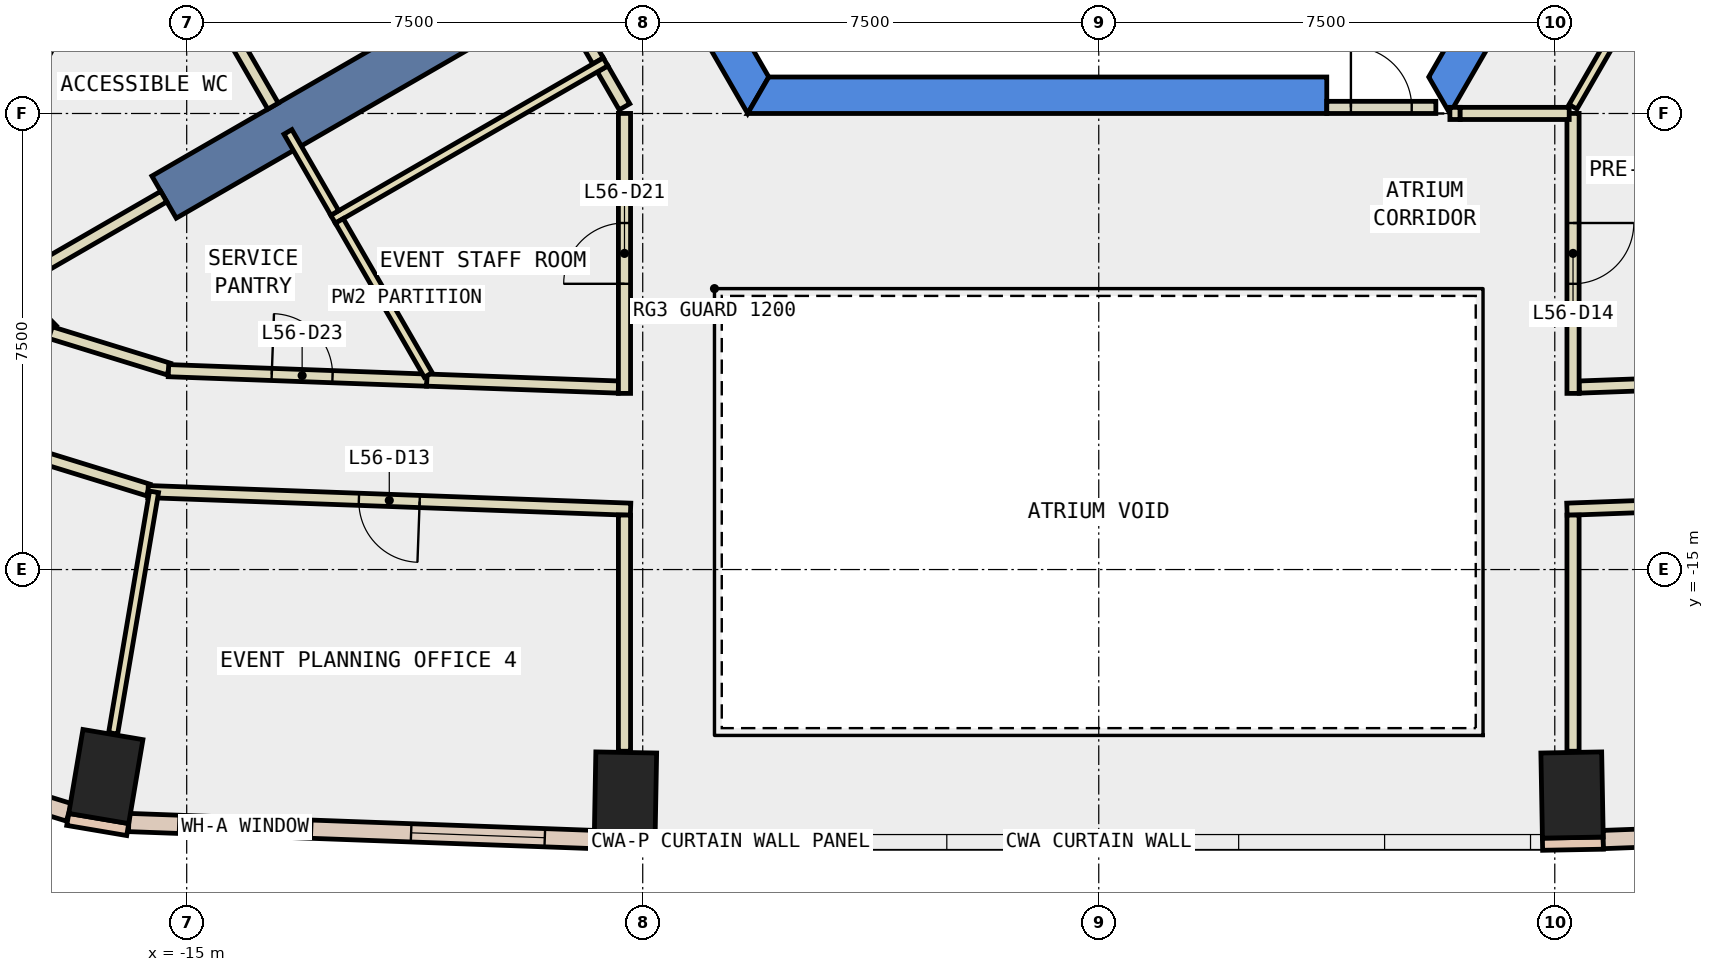
"""IFC4 building model, lengths in metres.
Left out: names, types, materials, properties, quantities, classifications, styles, units other than length and angle.
Written with IfcOpenShell. Run it as: python <this file> out.ifc"""

import sys

from ifc_helpers import new_model, si_unit, direction, frame, frame_2d, origin, origin_2d, place, context, subcontext, project, spatial, polyline, rectangle, outline, extrude, element, fill, save


model = new_model("IFC4")
c1 = context("Model", 3, precision=1e-05, world=origin(), true_north=direction((0.0, 1.0)))
c2 = subcontext(c1, "Body", "Model", "MODEL_VIEW")
j1 = project(units=[si_unit("LENGTHUNIT", "METRE"), si_unit("PLANEANGLEUNIT", "RADIAN")], contexts=[c1])
p1 = place(None, origin())
s1 = spatial("IfcSite", under=j1, at=p1, CompositionType="ELEMENT")
p2 = place(p1, origin())
s2 = spatial("IfcBuilding", under=s1, at=p2, CompositionType="ELEMENT")
p3 = place(p2, frame((0.0, 0.0, 248.6)))
s3 = spatial("IfcBuildingStorey", under=s2, at=p3, CompositionType="ELEMENT", Elevation=248.6)
for number, where, z_axis, x_axis in (
    (1, (-16.33, -18.404, -0.34), (0.0, 0.0, 1.0), (-0.986, 0.167, 0.0)),
    (2, (-7.784, -18.708, -0.34), (0.0, 0.0, 1.0), (-1.0, 0.018, 0.0)),
    (3, (7.784, -18.708, -0.34), (0.0, 0.0, 1.0), (1.0, 0.018, 0.0)),
):
    element("IfcColumn", number, at=place(p3, frame(where, z_axis=z_axis, x_axis=x_axis)), inside=s3, PredefinedType="COLUMN", context=c2, shape_type="SweptSolid", body=[
        extrude(rectangle(XDim=1.0, YDim=1.4, at=origin_2d()), origin(), (0.0, 0.0, 1.0), 3.6),
    ])
p4 = place(p3, frame((0.0, 0.0, -0.34)))
e4 = element("IfcWall", 4, at=p4, inside=s3, PredefinedType="SHEAR", context=c2, shape_type="SweptSolid", body=[
    extrude(outline(polyline([(-11.547, 2.5), (-5.774, -7.5), (-5.427, -6.9), (-10.854, 2.5), (-11.547, 2.5)])), origin(), (0.0, 0.0, 1.0), 3.6),
])
p5 = place(p3, frame((0.0, 0.0, -0.34)))
e5 = element("IfcWall", 5, at=p5, inside=s3, PredefinedType="SHEAR", context=c2, shape_type="SweptSolid", body=[
    extrude(outline(polyline([(3.75, -7.5), (3.75, -6.9), (-5.427, -6.9), (-5.774, -7.5), (3.75, -7.5)])), origin(), (0.0, 0.0, 1.0), 3.6),
])
p6 = place(p3, frame((0.0, 0.0, -0.34)))
e6 = element("IfcWall", 6, at=p6, inside=s3, PredefinedType="SHEAR", context=c2, shape_type="SweptSolid", body=[
    extrude(outline(polyline([(5.774, -7.5), (11.547, 2.5), (10.854, 2.5), (5.427, -6.9), (5.774, -7.5)])), origin(), (0.0, 0.0, 1.0), 3.6),
])
for number, where, z_axis, x_axis in (
    (7, (7.578, -4.375, -0.34), (0.0, 0.0, 1.0), (0.866, -0.5, 0.0)),
    (8, (-7.578, -4.375, -0.34), (0.0, 0.0, 1.0), (-0.866, -0.5, 0.0)),
):
    element("IfcWall", number, at=place(p3, frame(where, z_axis=z_axis, x_axis=x_axis)), inside=s3, PredefinedType="SHEAR", context=c2, shape_type="SweptSolid", body=[
        extrude(rectangle(XDim=9.0, YDim=0.8, at=frame_2d((4.5, 0.0))), origin(), (0.0, 0.0, 1.0), 3.6),
    ])
for number, where, z_axis, x_axis in (
    (9, (-16.956, -19.109, 0.0), (0.0, 0.0, 1.0), (0.986, -0.167, 0.0)),
    (10, (-8.298, -19.499, 0.0), (0.0, 0.0, 1.0), (1.0, -0.018, 0.0)),
    (11, (7.298, -19.517, 0.0), (0.0, 0.0, 1.0), (1.0, 0.018, 0.0)),
):
    element("IfcWall", number, at=place(p3, frame(where, z_axis=z_axis, x_axis=x_axis)), inside=s3, PredefinedType="STANDARD", context=c2, shape_type="SweptSolid", body=[
        extrude(rectangle(XDim=1.0, YDim=0.2, at=frame_2d((0.5, 0.0))), origin(), (0.0, 0.0, 1.0), 3.26),
    ])
p7 = place(p3, frame((-15.952, -19.16, 0.0), z_axis=(0.0, 0.0, 1.0), x_axis=(0.999331753125, -0.036551979363, 0.0)))
e12 = element("IfcWall", 12, at=p7, inside=s3, PredefinedType="STANDARD", context=c2, shape_type="SweptSolid", body=[
    extrude(rectangle(XDim=7.661, YDim=0.3, at=frame_2d((3.831, 0.0))), origin(), (0.0, 0.0, 1.0), 3.26),
])
p8 = place(p7, frame((0.815, 0.0, 0.9)))
e13 = element("IfcOpeningElement", 13, at=p8, cuts=e12, PredefinedType="OPENING", context=c2, shape_type="SweptSolid", body=[
    extrude(rectangle(XDim=2.2, YDim=2.0, at=frame_2d((1.1, 1.0))), frame((0.0, 0.16, 0.0), z_axis=(0.0, -1.0, 0.0), x_axis=(1.0, 0.0, 0.0)), (0.0, 0.0, 1.0), 0.32),
])
p9 = place(p7, frame((4.646, 0.0, 0.9)))
e14 = element("IfcOpeningElement", 14, at=p9, cuts=e12, PredefinedType="OPENING", context=c2, shape_type="SweptSolid", body=[
    extrude(rectangle(XDim=2.2, YDim=2.0, at=frame_2d((1.1, 1.0))), frame((0.0, 0.16, 0.0), z_axis=(0.0, -1.0, 0.0), x_axis=(1.0, 0.0, 0.0)), (0.0, 0.0, 1.0), 0.32),
])
p10 = place(p3, frame((8.296, -19.44, 0.0), z_axis=(0.0, 0.0, 1.0), x_axis=(0.999331753125, 0.036551979363, 0.0)))
e15 = element("IfcWall", 15, at=p10, inside=s3, PredefinedType="STANDARD", context=c2, shape_type="SweptSolid", body=[
    extrude(rectangle(XDim=7.661, YDim=0.3, at=frame_2d((3.831, 0.0))), origin(), (0.0, 0.0, 1.0), 3.26),
])
p11 = place(p10, frame((0.815, 0.0, 0.9)))
e16 = element("IfcOpeningElement", 16, at=p11, cuts=e15, PredefinedType="OPENING", context=c2, shape_type="SweptSolid", body=[
    extrude(rectangle(XDim=2.2, YDim=2.0, at=frame_2d((1.1, 1.0))), frame((0.0, 0.16, 0.0), z_axis=(0.0, -1.0, 0.0), x_axis=(1.0, 0.0, 0.0)), (0.0, 0.0, 1.0), 0.32),
])
p12 = place(p10, frame((4.646, 0.0, 0.9)))
e17 = element("IfcOpeningElement", 17, at=p12, cuts=e15, PredefinedType="OPENING", context=c2, shape_type="SweptSolid", body=[
    extrude(rectangle(XDim=2.2, YDim=2.0, at=frame_2d((1.1, 1.0))), frame((0.0, 0.16, 0.0), z_axis=(0.0, -1.0, 0.0), x_axis=(1.0, 0.0, 0.0)), (0.0, 0.0, 1.0), 0.32),
])
p13 = place(p3, frame((-20.661, -17.845, 0.0), z_axis=(0.0, 0.0, 1.0), x_axis=(0.955646189569, -0.2945171648, 0.0)))
e18 = element("IfcWall", 18, at=p13, inside=s3, PredefinedType="STANDARD", context=c2, shape_type="SweptSolid", body=[
    extrude(rectangle(XDim=3.898, YDim=0.3, at=frame_2d((1.949, 0.0))), origin(), (0.0, 0.0, 1.0), 3.26),
])
p14 = place(p13, frame((1.249, 0.0, 0.9)))
e19 = element("IfcOpeningElement", 19, at=p14, cuts=e18, PredefinedType="OPENING", context=c2, shape_type="SweptSolid", body=[
    extrude(rectangle(XDim=1.4, YDim=2.0, at=frame_2d((0.7, 1.0))), frame((0.0, 0.16, 0.0), z_axis=(0.0, -1.0, 0.0), x_axis=(1.0, 0.0, 0.0)), (0.0, 0.0, 1.0), 0.32),
])
p15 = place(p3, frame((7.9, -11.999, 0.0), z_axis=(0.0, 0.0, 1.0), x_axis=(0.999343711998, 0.036223546064, 0.0)))
e20 = element("IfcWall", 20, at=p15, inside=s3, PredefinedType="PARTITIONING", context=c2, shape_type="SweptSolid", body=[
    extrude(rectangle(XDim=2.979, YDim=0.2, at=frame_2d((1.49, 0.0))), origin(), (0.0, 0.0, 1.0), 3.26),
])
p16 = place(p3, frame((-8.235, -6.636, 0.0), z_axis=(0.0, 0.0, 1.0), x_axis=(-0.500089055364, 0.86597398154, 0.0)))
e21 = element("IfcWall", 21, at=p16, inside=s3, PredefinedType="PARTITIONING", context=c2, shape_type="SweptSolid", body=[
    extrude(rectangle(XDim=1.23, YDim=0.2, at=frame_2d((0.615, 0.0))), origin(), (0.0, 0.0, 1.0), 3.26),
])
p17 = place(p3, frame((-7.8, -7.39, 0.0), z_axis=(0.0, 0.0, 1.0), x_axis=(-0.499712670472, 0.866191230024, 0.0)))
e22 = element("IfcWall", 22, at=p17, inside=s3, PredefinedType="PARTITIONING", context=c2, shape_type="SweptSolid", body=[
    extrude(rectangle(XDim=0.72, YDim=0.2, at=frame_2d((0.36, 0.0))), origin(), (0.0, 0.0, 1.0), 3.26),
])
p18 = place(p3, frame((-11.052, -11.884, 0.0), z_axis=(0.0, 0.0, 1.0), x_axis=(0.999335249241, -0.036456270033, 0.0)))
e23 = element("IfcWall", 23, at=p18, inside=s3, PredefinedType="PARTITIONING", context=c2, shape_type="SweptSolid", body=[
    extrude(rectangle(XDim=3.154, YDim=0.2, at=frame_2d((1.577, 0.0))), origin(), (0.0, 0.0, 1.0), 3.26),
])
p19 = place(p3, frame((-15.746, -3.458, 0.0), z_axis=(0.0, 0.0, 1.0), x_axis=(-0.465179971699, -0.885216128372, 0.0)))
e24 = element("IfcWall", 24, at=p19, inside=s3, PredefinedType="PARTITIONING", context=c2, shape_type="SweptSolid", body=[
    extrude(rectangle(XDim=4.424, YDim=0.2, at=frame_2d((2.212, 0.0))), origin(), (0.0, 0.0, 1.0), 3.26),
])
p20 = place(p19, frame((1.712, 0.0, 0.0)))
e25 = element("IfcOpeningElement", 25, at=p20, cuts=e24, PredefinedType="OPENING", context=c2, shape_type="SweptSolid", body=[
    extrude(rectangle(XDim=1.0, YDim=2.1, at=frame_2d((0.5, 1.05))), frame((0.0, 0.11, 0.0), z_axis=(0.0, -1.0, 0.0), x_axis=(1.0, 0.0, 0.0)), (0.0, 0.0, 1.0), 0.22),
])
p21 = place(p3, frame((-17.915, -10.344, 0.0), z_axis=(0.0, 0.0, 1.0), x_axis=(0.698527813511, -0.715582904877, 0.0)))
e26 = element("IfcWall", 26, at=p21, inside=s3, PredefinedType="PARTITIONING", context=c2, shape_type="SweptSolid", body=[
    extrude(rectangle(XDim=1.002, YDim=0.2, at=frame_2d((0.501, 0.0))), origin(), (0.0, 0.0, 1.0), 3.26),
])
p22 = place(p3, frame((-17.241, -11.103, 0.0), z_axis=(0.0, 0.0, 1.0), x_axis=(0.95563113363, -0.294566013716, 0.0)))
e27 = element("IfcWall", 27, at=p22, inside=s3, PredefinedType="PARTITIONING", context=c2, shape_type="SweptSolid", body=[
    extrude(rectangle(XDim=2.036, YDim=0.2, at=frame_2d((1.018, 0.0))), origin(), (0.0, 0.0, 1.0), 3.26),
])
p23 = place(p3, frame((-15.3, -11.729, 0.0), z_axis=(0.0, 0.0, 1.0), x_axis=(0.999326350165, -0.036699398722, 0.0)))
e28 = element("IfcWall", 28, at=p23, inside=s3, PredefinedType="PARTITIONING", context=c2, shape_type="SweptSolid", body=[
    extrude(rectangle(XDim=4.251, YDim=0.2, at=frame_2d((2.125, 0.0))), origin(), (0.0, 0.0, 1.0), 3.26),
])
p24 = place(p23, frame((1.7, 0.0, 0.0)))
e29 = element("IfcOpeningElement", 29, at=p24, cuts=e28, PredefinedType="OPENING", context=c2, shape_type="SweptSolid", body=[
    extrude(rectangle(XDim=1.0, YDim=2.1, at=frame_2d((0.5, 1.05))), frame((0.0, 0.11, 0.0), z_axis=(0.0, -1.0, 0.0), x_axis=(1.0, 0.0, 0.0)), (0.0, 0.0, 1.0), 0.22),
])
p25 = place(p3, frame((15.636, -13.718, 0.0), z_axis=(0.0, 0.0, 1.0), x_axis=(-0.99933282306, -0.036522715615, 0.0)))
e30 = element("IfcWall", 30, at=p25, inside=s3, PredefinedType="PARTITIONING", context=c2, shape_type="SweptSolid", body=[
    extrude(rectangle(XDim=7.941, YDim=0.2, at=frame_2d((3.971, 0.0))), origin(), (0.0, 0.0, 1.0), 3.26),
])
p26 = place(p25, frame((3.471, 0.0, 0.0)))
e31 = element("IfcOpeningElement", 31, at=p26, cuts=e30, PredefinedType="OPENING", context=c2, shape_type="SweptSolid", body=[
    extrude(rectangle(XDim=1.0, YDim=2.1, at=frame_2d((0.5, 1.05))), frame((0.0, 0.11, 0.0), z_axis=(0.0, -1.0, 0.0), x_axis=(1.0, 0.0, 0.0)), (0.0, 0.0, 1.0), 0.22),
])
p27 = place(p3, frame((-19.696, -6.675, 0.0), z_axis=(0.0, 0.0, 1.0), x_axis=(0.465165163774, 0.88522390976, 0.0)))
e32 = element("IfcWall", 32, at=p27, inside=s3, PredefinedType="PARTITIONING", context=c2, shape_type="SweptSolid", body=[
    extrude(rectangle(XDim=5.835, YDim=0.2, at=frame_2d((2.917, 0.0))), origin(), (0.0, 0.0, 1.0), 3.26),
])
p28 = place(p27, frame((2.492, 0.0, 0.0)))
e33 = element("IfcOpeningElement", 33, at=p28, cuts=e32, PredefinedType="OPENING", context=c2, shape_type="SweptSolid", body=[
    extrude(rectangle(XDim=1.0, YDim=2.1, at=frame_2d((0.5, 1.05))), frame((0.0, 0.11, 0.0), z_axis=(0.0, -1.0, 0.0), x_axis=(1.0, 0.0, 0.0)), (0.0, 0.0, 1.0), 0.22),
])
p29 = place(p3, frame((-15.632, -13.692, 0.0), z_axis=(0.0, 0.0, 1.0), x_axis=(-0.955600342663, 0.294665887239, 0.0)))
e34 = element("IfcWall", 34, at=p29, inside=s3, PredefinedType="PARTITIONING", context=c2, shape_type="SweptSolid", body=[
    extrude(rectangle(XDim=2.81, YDim=0.2, at=frame_2d((1.405, 0.0))), origin(), (0.0, 0.0, 1.0), 3.26),
])
p30 = place(p3, frame((-7.7, -14.008, 0.0), z_axis=(0.0, 0.0, 1.0), x_axis=(-0.99933282306, 0.036522715615, 0.0)))
e35 = element("IfcWall", 35, at=p30, inside=s3, PredefinedType="PARTITIONING", context=c2, shape_type="SweptSolid", body=[
    extrude(rectangle(XDim=7.941, YDim=0.2, at=frame_2d((3.971, 0.0))), origin(), (0.0, 0.0, 1.0), 3.26),
])
p31 = place(p30, frame((3.471, 0.0, 0.0)))
e36 = element("IfcOpeningElement", 36, at=p31, cuts=e35, PredefinedType="OPENING", context=c2, shape_type="SweptSolid", body=[
    extrude(rectangle(XDim=1.0, YDim=2.1, at=frame_2d((0.5, 1.05))), frame((0.0, 0.11, 0.0), z_axis=(0.0, -1.0, 0.0), x_axis=(1.0, 0.0, 0.0)), (0.0, 0.0, 1.0), 0.22),
])
p32 = place(p3, frame((5.775, -7.499, 0.0), z_axis=(0.0, 0.0, 1.0), x_axis=(1.0, 0.0, 0.0)))
e37 = element("IfcWall", 37, at=p32, inside=s3, PredefinedType="PARTITIONING", context=c2, shape_type="SweptSolid", body=[
    extrude(rectangle(XDim=0.169, YDim=0.2, at=frame_2d((0.084, 0.0))), origin(), (0.0, 0.0, 1.0), 2.4),
])
p33 = place(p3, frame((7.8, -7.39, 0.0), z_axis=(0.0, 0.0, 1.0), x_axis=(0.499977374825, 0.866038466041, 0.0)))
e38 = element("IfcWall", 38, at=p33, inside=s3, PredefinedType="PARTITIONING", context=c2, shape_type="SweptSolid", body=[
    extrude(rectangle(XDim=2.1, YDim=0.15, at=frame_2d((1.05, 0.0))), origin(), (0.0, 0.0, 1.0), 3.26),
])
p34 = place(p3, frame((7.8, -7.499, 0.0), z_axis=(0.0, 0.0, 1.0), x_axis=(0.0, -1.0, 0.0)))
e39 = element("IfcWall", 39, at=p34, inside=s3, PredefinedType="PARTITIONING", context=c2, shape_type="SweptSolid", body=[
    extrude(rectangle(XDim=4.604, YDim=0.2, at=frame_2d((2.302, 0.0))), origin(), (0.0, 0.0, 1.0), 3.26),
])
p35 = place(p34, frame((1.802, 0.0, 0.0)))
e40 = element("IfcOpeningElement", 40, at=p35, cuts=e39, PredefinedType="OPENING", context=c2, shape_type="SweptSolid", body=[
    extrude(rectangle(XDim=1.0, YDim=2.1, at=frame_2d((0.5, 1.05))), frame((0.0, 0.11, 0.0), z_axis=(0.0, -1.0, 0.0), x_axis=(1.0, 0.0, 0.0)), (0.0, 0.0, 1.0), 0.22),
])
p36 = place(p3, frame((-7.8, -12.103, 0.0), z_axis=(0.0, 0.0, 1.0), x_axis=(0.0, 1.0, 0.0)))
e41 = element("IfcWall", 41, at=p36, inside=s3, PredefinedType="PARTITIONING", context=c2, shape_type="SweptSolid", body=[
    extrude(rectangle(XDim=4.604, YDim=0.2, at=frame_2d((2.302, 0.0))), origin(), (0.0, 0.0, 1.0), 3.26),
])
p37 = place(p36, frame((1.802, 0.0, 0.0)))
e42 = element("IfcOpeningElement", 42, at=p37, cuts=e41, PredefinedType="OPENING", context=c2, shape_type="SweptSolid", body=[
    extrude(rectangle(XDim=1.0, YDim=2.1, at=frame_2d((0.5, 1.05))), frame((0.0, 0.11, 0.0), z_axis=(0.0, -1.0, 0.0), x_axis=(1.0, 0.0, 0.0)), (0.0, 0.0, 1.0), 0.22),
])
for number, where, z_axis, x_axis in (
    (43, (7.8, -14.104, 0.0), (0.0, 0.0, 1.0), (0.0, -1.0, 0.0)),
    (44, (-7.8, -17.988, 0.0), (0.0, 0.0, 1.0), (0.0, 1.0, 0.0)),
):
    element("IfcWall", number, at=place(p3, frame(where, z_axis=z_axis, x_axis=x_axis)), inside=s3, PredefinedType="PARTITIONING", context=c2, shape_type="SweptSolid", body=[
        extrude(rectangle(XDim=3.884, YDim=0.2, at=frame_2d((1.942, 0.0))), origin(), (0.0, 0.0, 1.0), 3.26),
    ])
p38 = place(p3, frame((-8.111, -6.651, 0.0), z_axis=(0.0, 0.0, 1.0), x_axis=(-0.865984471925, -0.50007088936, 0.0)))
e45 = element("IfcWall", 45, at=p38, inside=s3, PredefinedType="PARTITIONING", context=c2, shape_type="SweptSolid", body=[
    extrude(rectangle(XDim=5.176, YDim=0.15, at=frame_2d((2.588, 0.0))), origin(), (0.0, 0.0, 1.0), 3.26),
])
p39 = place(p3, frame((-13.58, -7.379, 0.0), z_axis=(0.0, 0.0, 1.0), x_axis=(-0.499870876044, 0.866099940701, 0.0)))
e46 = element("IfcWall", 46, at=p39, inside=s3, PredefinedType="PARTITIONING", context=c2, shape_type="SweptSolid", body=[
    extrude(rectangle(XDim=2.611, YDim=0.2, at=frame_2d((1.305, 0.0))), origin(), (0.0, 0.0, 1.0), 3.26),
])
p40 = place(p3, frame((-12.565, -9.136, 0.0), z_axis=(0.0, 0.0, 1.0), x_axis=(-0.500198329269, 0.865910868044, 0.0)))
e47 = element("IfcWall", 47, at=p40, inside=s3, PredefinedType="PARTITIONING", context=c2, shape_type="SweptSolid", body=[
    extrude(rectangle(XDim=1.539, YDim=0.15, at=frame_2d((0.77, 0.0))), origin(), (0.0, 0.0, 1.0), 3.26),
])
p41 = place(p3, frame((-11.027, -11.8, 0.0), z_axis=(0.0, 0.0, 1.0), x_axis=(-0.499980071345, 0.866036909293, 0.0)))
e48 = element("IfcWall", 48, at=p41, inside=s3, PredefinedType="PARTITIONING", context=c2, shape_type="SweptSolid", body=[
    extrude(rectangle(XDim=2.926, YDim=0.15, at=frame_2d((1.463, 0.0))), origin(), (0.0, 0.0, 1.0), 3.26),
])
p42 = place(p3, frame((-15.377, -8.867, 0.0), z_axis=(0.0, 0.0, 1.0), x_axis=(-0.865965767548, -0.500103278768, 0.0)))
e49 = element("IfcWall", 49, at=p42, inside=s3, PredefinedType="PARTITIONING", context=c2, shape_type="SweptSolid", body=[
    extrude(rectangle(XDim=3.033, YDim=0.2, at=frame_2d((1.517, 0.0))), origin(), (0.0, 0.0, 1.0), 3.26),
])
p43 = place(p3, frame((-15.537, -13.722, 0.0), z_axis=(0.0, 0.0, 1.0), x_axis=(-0.167012380144, -0.985954798598, 0.0)))
e50 = element("IfcWall", 50, at=p43, inside=s3, PredefinedType="PARTITIONING", context=c2, shape_type="SweptSolid", body=[
    extrude(rectangle(XDim=4.029, YDim=0.15, at=frame_2d((2.014, 0.0))), origin(), (0.0, 0.0, 1.0), 3.26),
])
p44 = place(p3, frame((3.75, -7.4, 0.0), z_axis=(0.0, 0.0, 1.0), x_axis=(1.0, 0.0, 0.0)))
e51 = element("IfcWall", 51, at=p44, inside=s3, PredefinedType="PARTITIONING", context=c2, shape_type="SweptSolid", body=[
    extrude(rectangle(XDim=1.794, YDim=0.2, at=frame_2d((0.897, 0.0))), origin(), (0.0, 0.0, 1.0), 2.4),
])
p45 = place(p44, frame((0.397, 0.0, 0.0)))
e52 = element("IfcOpeningElement", 52, at=p45, cuts=e51, PredefinedType="OPENING", context=c2, shape_type="SweptSolid", body=[
    extrude(rectangle(XDim=1.0, YDim=2.1, at=frame_2d((0.5, 1.05))), frame((0.0, 0.11, 0.0), z_axis=(0.0, -1.0, 0.0), x_axis=(1.0, 0.0, 0.0)), (0.0, 0.0, 1.0), 0.22),
])
p46 = place(p3, frame((5.944, -7.499, 0.0), z_axis=(0.0, 0.0, 1.0), x_axis=(1.0, 0.0, 0.0)))
e53 = element("IfcWall", 53, at=p46, inside=s3, PredefinedType="PARTITIONING", context=c2, shape_type="SweptSolid", body=[
    extrude(rectangle(XDim=1.793, YDim=0.2, at=frame_2d((0.896, 0.0))), origin(), (0.0, 0.0, 1.0), 3.26),
])
p47 = place(p8, origin())
e54 = element("IfcWindow", 54, at=p47, inside=s3, PartitioningType="SINGLE_PANEL", PredefinedType="WINDOW", context=c2, shape_type="SweptSolid", body=[
    extrude(rectangle(XDim=2.2, YDim=2.0, at=frame_2d((1.1, 1.0))), frame((0.0, 0.03, 0.0), z_axis=(0.0, -1.0, 0.0), x_axis=(1.0, 0.0, 0.0)), (0.0, 0.0, 1.0), 0.06),
])
fill(e13, e54)
p48 = place(p9, origin())
e55 = element("IfcWindow", 55, at=p48, inside=s3, PartitioningType="SINGLE_PANEL", PredefinedType="WINDOW", context=c2, shape_type="SweptSolid", body=[
    extrude(rectangle(XDim=2.2, YDim=2.0, at=frame_2d((1.1, 1.0))), frame((0.0, 0.03, 0.0), z_axis=(0.0, -1.0, 0.0), x_axis=(1.0, 0.0, 0.0)), (0.0, 0.0, 1.0), 0.06),
])
fill(e14, e55)
p49 = place(p31, origin())
e56 = element("IfcDoor", 56, at=p49, inside=s3, OperationType="SINGLE_SWING_RIGHT", PredefinedType="DOOR", context=c2, shape_type="SweptSolid", body=[
    extrude(rectangle(XDim=1.0, YDim=2.1, at=frame_2d((0.5, 1.05))), frame((0.0, 0.025, 0.0), z_axis=(0.0, -1.0, 0.0), x_axis=(1.0, 0.0, 0.0)), (0.0, 0.0, 1.0), 0.05),
])
fill(e36, e56)
p50 = place(p35, origin())
e57 = element("IfcDoor", 57, at=p50, inside=s3, OperationType="SINGLE_SWING_LEFT", PredefinedType="DOOR", context=c2, shape_type="SweptSolid", body=[
    extrude(rectangle(XDim=1.0, YDim=2.1, at=frame_2d((0.5, 1.05))), frame((0.0, 0.025, 0.0), z_axis=(0.0, -1.0, 0.0), x_axis=(1.0, 0.0, 0.0)), (0.0, 0.0, 1.0), 0.05),
])
fill(e40, e57)
p51 = place(p37, origin())
e58 = element("IfcDoor", 58, at=p51, inside=s3, OperationType="SINGLE_SWING_LEFT", PredefinedType="DOOR", context=c2, shape_type="SweptSolid", body=[
    extrude(rectangle(XDim=1.0, YDim=2.1, at=frame_2d((0.5, 1.05))), frame((0.0, 0.025, 0.0), z_axis=(0.0, -1.0, 0.0), x_axis=(1.0, 0.0, 0.0)), (0.0, 0.0, 1.0), 0.05),
])
fill(e42, e58)
p52 = place(p24, origin())
e59 = element("IfcDoor", 59, at=p52, inside=s3, OperationType="SINGLE_SWING_LEFT", PredefinedType="DOOR", context=c2, shape_type="SweptSolid", body=[
    extrude(rectangle(XDim=1.0, YDim=2.1, at=frame_2d((0.5, 1.05))), frame((0.0, 0.025, 0.0), z_axis=(0.0, -1.0, 0.0), x_axis=(1.0, 0.0, 0.0)), (0.0, 0.0, 1.0), 0.05),
])
fill(e29, e59)
p53 = place(p45, origin())
e60 = element("IfcDoor", 60, at=p53, inside=s3, OperationType="SINGLE_SWING_LEFT", PredefinedType="DOOR", context=c2, shape_type="SweptSolid", body=[
    extrude(rectangle(XDim=1.0, YDim=2.1, at=frame_2d((0.5, 1.05))), frame((0.0, 0.025, 0.0), z_axis=(0.0, -1.0, 0.0), x_axis=(1.0, 0.0, 0.0)), (0.0, 0.0, 1.0), 0.05),
])
fill(e52, e60)
save(model, sys.argv[1])
